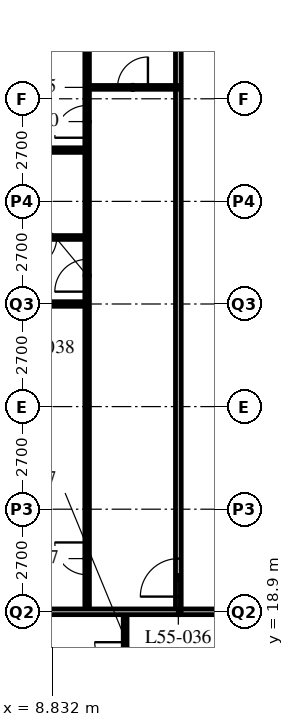
"""IFC4 building model, lengths in metres.
Left out: names, types, materials, properties, quantities, classifications, styles, units other than length and angle.
Written with IfcOpenShell. Run it as: python <this file> out.ifc"""

import sys

from ifc_helpers import new_model, si_unit, direction, frame, frame_2d, origin, place, context, subcontext, project, spatial, rectangle, extrude, element, fill, save


model = new_model("IFC4")
c1 = context("Model", 3, precision=1e-05, world=origin(), true_north=direction((0.0, 1.0)))
c2 = subcontext(c1, "Body", "Model", "MODEL_VIEW")
j1 = project(units=[si_unit("LENGTHUNIT", "METRE"), si_unit("PLANEANGLEUNIT", "RADIAN")], contexts=[c1])
p1 = place(None, origin())
s1 = spatial("IfcSite", under=j1, at=p1, CompositionType="ELEMENT")
p2 = place(p1, origin())
s2 = spatial("IfcBuilding", under=s1, at=p2, CompositionType="ELEMENT")
p3 = place(p2, frame((0.0, 0.0, 213.6)))
s3 = spatial("IfcBuildingStorey", under=s2, at=p3, CompositionType="ELEMENT", Elevation=213.6)
p4 = place(p3, frame((12.15, 18.9, 0.0), z_axis=(0.0, 0.0, 1.0), x_axis=(1.0, 0.0, 0.0)))
e1 = element("IfcWall", 1, at=p4, inside=s3, PredefinedType="PARTITIONING", context=c2, shape_type="SweptSolid", body=[
    extrude(rectangle(XDim=36.45, YDim=0.15, at=frame_2d((18.225, 0.0))), origin(), (0.0, 0.0, 1.0), 2.778),
])
p5 = place(p4, frame((4.95, 0.0, 0.0)))
e2 = element("IfcOpeningElement", 2, at=p5, cuts=e1, PredefinedType="OPENING", context=c2, shape_type="SweptSolid", body=[
    extrude(rectangle(XDim=1.0, YDim=2.1, at=frame_2d((0.5, 1.05))), frame((0.0, 0.085, 0.0), z_axis=(0.0, -1.0, 0.0), x_axis=(1.0, 0.0, 0.0)), (0.0, 0.0, 1.0), 0.17),
])
p6 = place(p4, frame((22.6, 0.0, 0.0)))
e3 = element("IfcOpeningElement", 3, at=p6, cuts=e1, PredefinedType="OPENING", context=c2, shape_type="SweptSolid", body=[
    extrude(rectangle(XDim=1.0, YDim=2.1, at=frame_2d((0.5, 1.05))), frame((0.0, 0.085, 0.0), z_axis=(0.0, -1.0, 0.0), x_axis=(1.0, 0.0, 0.0)), (0.0, 0.0, 1.0), 0.17),
])
p7 = place(p4, frame((25.0, 0.0, 0.0)))
e4 = element("IfcOpeningElement", 4, at=p7, cuts=e1, PredefinedType="OPENING", context=c2, shape_type="SweptSolid", body=[
    extrude(rectangle(XDim=1.0, YDim=2.1, at=frame_2d((0.5, 1.05))), frame((0.0, 0.085, 0.0), z_axis=(0.0, -1.0, 0.0), x_axis=(1.0, 0.0, 0.0)), (0.0, 0.0, 1.0), 0.17),
])
p8 = place(p4, frame((30.7, 0.0, 0.0)))
e5 = element("IfcOpeningElement", 5, at=p8, cuts=e1, PredefinedType="OPENING", context=c2, shape_type="SweptSolid", body=[
    extrude(rectangle(XDim=1.0, YDim=2.1, at=frame_2d((0.5, 1.05))), frame((0.0, 0.085, 0.0), z_axis=(0.0, -1.0, 0.0), x_axis=(1.0, 0.0, 0.0)), (0.0, 0.0, 1.0), 0.17),
])
p9 = place(p4, frame((1.525, 0.0, 0.0)))
e6 = element("IfcOpeningElement", 6, at=p9, cuts=e1, PredefinedType="OPENING", context=c2, shape_type="SweptSolid", body=[
    extrude(rectangle(XDim=1.0, YDim=2.1, at=frame_2d((0.5, 1.05))), frame((0.0, 0.085, 0.0), z_axis=(0.0, -1.0, 0.0), x_axis=(1.0, 0.0, 0.0)), (0.0, 0.0, 1.0), 0.17),
])
p10 = place(p4, frame((32.825, 0.0, 0.0)))
e7 = element("IfcOpeningElement", 7, at=p10, cuts=e1, PredefinedType="OPENING", context=c2, shape_type="SweptSolid", body=[
    extrude(rectangle(XDim=1.0, YDim=2.1, at=frame_2d((0.5, 1.05))), frame((0.0, 0.085, 0.0), z_axis=(0.0, -1.0, 0.0), x_axis=(1.0, 0.0, 0.0)), (0.0, 0.0, 1.0), 0.17),
])
p11 = place(p3, frame((12.15, 18.9, 0.0), z_axis=(0.0, 0.0, 1.0), x_axis=(0.0, 1.0, 0.0)))
e8 = element("IfcWall", 8, at=p11, inside=s3, PredefinedType="PARTITIONING", context=c2, shape_type="SweptSolid", body=[
    extrude(rectangle(XDim=24.3, YDim=0.15, at=frame_2d((12.15, 0.0))), origin(), (0.0, 0.0, 1.0), 3.39),
])
p12 = place(p11, frame((0.4, 0.0, 0.0)))
e9 = element("IfcOpeningElement", 9, at=p12, cuts=e8, PredefinedType="OPENING", context=c2, shape_type="SweptSolid", body=[
    extrude(rectangle(XDim=1.0, YDim=2.1, at=frame_2d((0.5, 1.05))), frame((0.0, 0.085, 0.0), z_axis=(0.0, -1.0, 0.0), x_axis=(1.0, 0.0, 0.0)), (0.0, 0.0, 1.0), 0.17),
])
p13 = place(p11, frame((16.6, 0.0, 0.0)))
e10 = element("IfcOpeningElement", 10, at=p13, cuts=e8, PredefinedType="OPENING", context=c2, shape_type="SweptSolid", body=[
    extrude(rectangle(XDim=1.0, YDim=2.1, at=frame_2d((0.5, 1.05))), frame((0.0, 0.085, 0.0), z_axis=(0.0, -1.0, 0.0), x_axis=(1.0, 0.0, 0.0)), (0.0, 0.0, 1.0), 0.17),
])
p14 = place(p3, frame((9.75, 18.9, 0.0), z_axis=(0.0, 0.0, 1.0), x_axis=(0.0, 1.0, 0.0)))
e11 = element("IfcWall", 11, at=p14, inside=s3, PredefinedType="PARTITIONING", context=c2, shape_type="SweptSolid", body=[
    extrude(rectangle(XDim=24.3, YDim=0.12, at=frame_2d((12.15, 0.0))), origin(), (0.0, 0.0, 1.0), 3.39),
])
p15 = place(p14, frame((0.975, 0.0, 0.0)))
e12 = element("IfcOpeningElement", 12, at=p15, cuts=e11, PredefinedType="OPENING", context=c2, shape_type="SweptSolid", body=[
    extrude(rectangle(XDim=0.85, YDim=2.1, at=frame_2d((0.425, 1.05))), frame((0.0, 0.07, 0.0), z_axis=(0.0, -1.0, 0.0), x_axis=(1.0, 0.0, 0.0)), (0.0, 0.0, 1.0), 0.14),
])
p16 = place(p14, frame((8.425, 0.0, 0.0)))
e13 = element("IfcOpeningElement", 13, at=p16, cuts=e11, PredefinedType="OPENING", context=c2, shape_type="SweptSolid", body=[
    extrude(rectangle(XDim=0.85, YDim=2.1, at=frame_2d((0.425, 1.05))), frame((0.0, 0.07, 0.0), z_axis=(0.0, -1.0, 0.0), x_axis=(1.0, 0.0, 0.0)), (0.0, 0.0, 1.0), 0.14),
])
p17 = place(p14, frame((12.475, 0.0, 0.0)))
e14 = element("IfcOpeningElement", 14, at=p17, cuts=e11, PredefinedType="OPENING", context=c2, shape_type="SweptSolid", body=[
    extrude(rectangle(XDim=0.85, YDim=2.1, at=frame_2d((0.425, 1.05))), frame((0.0, 0.07, 0.0), z_axis=(0.0, -1.0, 0.0), x_axis=(1.0, 0.0, 0.0)), (0.0, 0.0, 1.0), 0.14),
])
p18 = place(p14, frame((17.175, 0.0, 0.0)))
e15 = element("IfcOpeningElement", 15, at=p18, cuts=e11, PredefinedType="OPENING", context=c2, shape_type="SweptSolid", body=[
    extrude(rectangle(XDim=0.85, YDim=2.1, at=frame_2d((0.425, 1.05))), frame((0.0, 0.07, 0.0), z_axis=(0.0, -1.0, 0.0), x_axis=(1.0, 0.0, 0.0)), (0.0, 0.0, 1.0), 0.14),
])
p19 = place(p14, frame((20.575, 0.0, 0.0)))
e16 = element("IfcOpeningElement", 16, at=p19, cuts=e11, PredefinedType="OPENING", context=c2, shape_type="SweptSolid", body=[
    extrude(rectangle(XDim=0.85, YDim=2.1, at=frame_2d((0.425, 1.05))), frame((0.0, 0.07, 0.0), z_axis=(0.0, -1.0, 0.0), x_axis=(1.0, 0.0, 0.0)), (0.0, 0.0, 1.0), 0.14),
])
p20 = place(p3, frame((12.15, 32.7, 0.0), z_axis=(0.0, 0.0, 1.0), x_axis=(-1.0, 0.0, 0.0)))
e17 = element("IfcWall", 17, at=p20, inside=s3, PredefinedType="PARTITIONING", context=c2, shape_type="SweptSolid", body=[
    extrude(rectangle(XDim=2.4, YDim=0.1, at=frame_2d((1.2, 0.0))), origin(), (0.0, 0.0, 1.0), 3.39),
])
p21 = place(p20, frame((0.8, 0.0, 0.0)))
e18 = element("IfcOpeningElement", 18, at=p21, cuts=e17, PredefinedType="OPENING", context=c2, shape_type="SweptSolid", body=[
    extrude(rectangle(XDim=0.8, YDim=2.1, at=frame_2d((0.4, 1.05))), frame((0.0, 0.06, 0.0), z_axis=(0.0, -1.0, 0.0), x_axis=(1.0, 0.0, 0.0)), (0.0, 0.0, 1.0), 0.12),
])
p22 = place(p3, frame((9.75, 28.75, 0.0), z_axis=(0.0, 0.0, 1.0), x_axis=(-1.0, 0.0, 0.0)))
e19 = element("IfcWall", 19, at=p22, inside=s3, PredefinedType="PARTITIONING", context=c2, shape_type="SweptSolid", body=[
    extrude(rectangle(XDim=2.4, YDim=0.1, at=frame_2d((1.2, 0.0))), origin(), (0.0, 0.0, 1.0), 3.39),
])
p23 = place(p22, frame((0.8, 0.0, 0.0)))
e20 = element("IfcOpeningElement", 20, at=p23, cuts=e19, PredefinedType="OPENING", context=c2, shape_type="SweptSolid", body=[
    extrude(rectangle(XDim=0.8, YDim=2.1, at=frame_2d((0.4, 1.05))), frame((0.0, 0.06, 0.0), z_axis=(0.0, -1.0, 0.0), x_axis=(1.0, 0.0, 0.0)), (0.0, 0.0, 1.0), 0.12),
])
p24 = place(p3, frame((9.75, 27.0, 0.0), z_axis=(0.0, 0.0, 1.0), x_axis=(-1.0, 0.0, 0.0)))
e21 = element("IfcWall", 21, at=p24, inside=s3, PredefinedType="PARTITIONING", context=c2, shape_type="SweptSolid", body=[
    extrude(rectangle(XDim=9.45, YDim=0.12, at=frame_2d((4.725, 0.0))), origin(), (0.0, 0.0, 1.0), 2.778),
])
p25 = place(p3, frame((9.75, 31.05, 0.0), z_axis=(0.0, 0.0, 1.0), x_axis=(-1.0, 0.0, 0.0)))
e22 = element("IfcWall", 22, at=p25, inside=s3, PredefinedType="PARTITIONING", context=c2, shape_type="SweptSolid", body=[
    extrude(rectangle(XDim=9.45, YDim=0.12, at=frame_2d((4.725, 0.0))), origin(), (0.0, 0.0, 1.0), 3.39),
])
p26 = place(p3, frame((10.75, 18.9, 0.0), z_axis=(0.0, 0.0, 1.0), x_axis=(0.0, -1.0, 0.0)))
e23 = element("IfcWall", 23, at=p26, inside=s3, PredefinedType="PARTITIONING", context=c2, shape_type="SweptSolid", body=[
    extrude(rectangle(XDim=2.4, YDim=0.1, at=frame_2d((1.2, 0.0))), origin(), (0.0, 0.0, 1.0), 3.39),
])
p27 = place(p26, frame((0.8, 0.0, 0.0)))
e24 = element("IfcOpeningElement", 24, at=p27, cuts=e23, PredefinedType="OPENING", context=c2, shape_type="SweptSolid", body=[
    extrude(rectangle(XDim=0.8, YDim=2.1, at=frame_2d((0.4, 1.05))), frame((0.0, 0.06, 0.0), z_axis=(0.0, -1.0, 0.0), x_axis=(1.0, 0.0, 0.0)), (0.0, 0.0, 1.0), 0.12),
])
p28 = place(p3, frame((4.35, 18.9, 0.0), z_axis=(0.0, 0.0, 1.0), x_axis=(1.0, 0.0, 0.0)))
e25 = element("IfcWall", 25, at=p28, inside=s3, PredefinedType="PARTITIONING", context=c2, shape_type="SweptSolid", body=[
    extrude(rectangle(XDim=7.8, YDim=0.15, at=frame_2d((3.9, 0.0))), origin(), (0.0, 0.0, 1.0), 2.778),
])
p29 = place(p21, origin())
e26 = element("IfcDoor", 26, at=p29, inside=s3, OperationType="SINGLE_SWING_RIGHT", PredefinedType="DOOR", context=c2, shape_type="SweptSolid", body=[
    extrude(rectangle(XDim=0.8, YDim=2.1, at=frame_2d((0.4, 1.05))), frame((0.0, 0.025, 0.0), z_axis=(0.0, -1.0, 0.0), x_axis=(1.0, 0.0, 0.0)), (0.0, 0.0, 1.0), 0.05),
])
fill(e18, e26)
p30 = place(p12, origin())
e27 = element("IfcDoor", 27, at=p30, inside=s3, OperationType="SINGLE_SWING_LEFT", PredefinedType="DOOR", context=c2, shape_type="SweptSolid", body=[
    extrude(rectangle(XDim=1.0, YDim=2.1, at=frame_2d((0.5, 1.05))), frame((0.0, 0.025, 0.0), z_axis=(0.0, -1.0, 0.0), x_axis=(1.0, 0.0, 0.0)), (0.0, 0.0, 1.0), 0.05),
])
fill(e9, e27)
p31 = place(p15, origin())
e28 = element("IfcDoor", 28, at=p31, inside=s3, OperationType="SINGLE_SWING_RIGHT", PredefinedType="DOOR", context=c2, shape_type="SweptSolid", body=[
    extrude(rectangle(XDim=0.85, YDim=2.1, at=frame_2d((0.425, 1.05))), frame((0.0, 0.025, 0.0), z_axis=(0.0, -1.0, 0.0), x_axis=(1.0, 0.0, 0.0)), (0.0, 0.0, 1.0), 0.05),
])
fill(e12, e28)
p32 = place(p23, origin())
e29 = element("IfcDoor", 29, at=p32, inside=s3, OperationType="SINGLE_SWING_RIGHT", PredefinedType="DOOR", context=c2, shape_type="SweptSolid", body=[
    extrude(rectangle(XDim=0.8, YDim=2.1, at=frame_2d((0.4, 1.05))), frame((0.0, 0.025, 0.0), z_axis=(0.0, -1.0, 0.0), x_axis=(1.0, 0.0, 0.0)), (0.0, 0.0, 1.0), 0.05),
])
fill(e20, e29)
p33 = place(p16, origin())
e30 = element("IfcDoor", 30, at=p33, inside=s3, OperationType="SINGLE_SWING_LEFT", PredefinedType="DOOR", context=c2, shape_type="SweptSolid", body=[
    extrude(rectangle(XDim=0.85, YDim=2.1, at=frame_2d((0.425, 1.05))), frame((0.0, 0.025, 0.0), z_axis=(0.0, -1.0, 0.0), x_axis=(1.0, 0.0, 0.0)), (0.0, 0.0, 1.0), 0.05),
])
fill(e13, e30)
p34 = place(p17, origin())
e31 = element("IfcDoor", 31, at=p34, inside=s3, OperationType="SINGLE_SWING_LEFT", PredefinedType="DOOR", context=c2, shape_type="SweptSolid", body=[
    extrude(rectangle(XDim=0.85, YDim=2.1, at=frame_2d((0.425, 1.05))), frame((0.0, 0.025, 0.0), z_axis=(0.0, -1.0, 0.0), x_axis=(1.0, 0.0, 0.0)), (0.0, 0.0, 1.0), 0.05),
])
fill(e14, e31)
p35 = place(p27, origin())
e32 = element("IfcDoor", 32, at=p35, inside=s3, OperationType="SINGLE_SWING_RIGHT", PredefinedType="DOOR", context=c2, shape_type="SweptSolid", body=[
    extrude(rectangle(XDim=0.8, YDim=2.1, at=frame_2d((0.4, 1.05))), frame((0.0, 0.025, 0.0), z_axis=(0.0, -1.0, 0.0), x_axis=(1.0, 0.0, 0.0)), (0.0, 0.0, 1.0), 0.05),
])
fill(e24, e32)
save(model, sys.argv[1])
